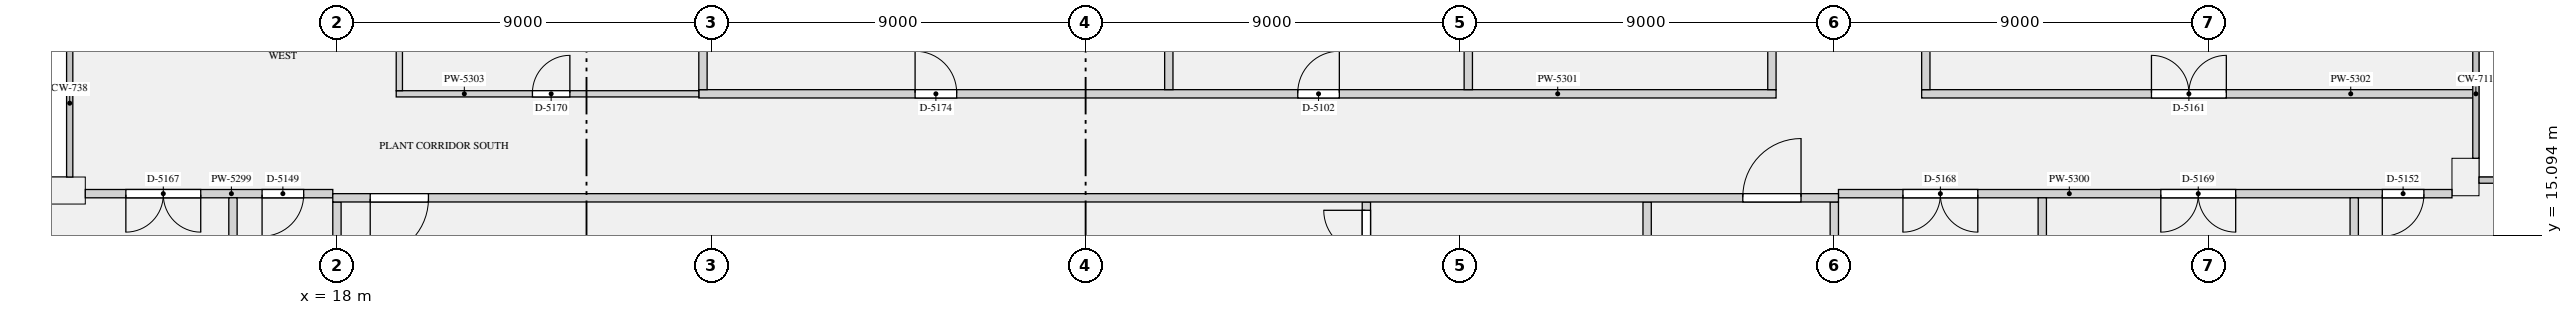
"""IFC4 building model, lengths in metres.
Left out: names, types, materials, properties, quantities, classifications, styles, units other than length and angle.
Written with IfcOpenShell. Run it as: python <this file> out.ifc"""

import sys

from ifc_helpers import new_model, si_unit, direction, frame, frame_2d, origin, origin_2d, place, context, subcontext, project, spatial, rectangle, extrude, element, fill, save


model = new_model("IFC4")
c1 = context("Model", 3, precision=1e-05, world=origin(), true_north=direction((0.0, 1.0)))
c2 = subcontext(c1, "Body", "Model", "MODEL_VIEW")
j1 = project(units=[si_unit("LENGTHUNIT", "METRE"), si_unit("PLANEANGLEUNIT", "RADIAN")], contexts=[c1])
p1 = place(None, origin())
s1 = spatial("IfcSite", under=j1, at=p1, CompositionType="ELEMENT")
p2 = place(p1, origin())
s2 = spatial("IfcBuilding", under=s1, at=p2, CompositionType="ELEMENT")
p3 = place(p2, frame((0.0, 0.0, 240.0)))
s3 = spatial("IfcBuildingStorey", under=s2, at=p3, CompositionType="ELEMENT", Elevation=240.0)
for number, where, z_axis, x_axis in (
    (1, (69.175, 16.5, 0.0), (0.0, 0.0, 1.0), (0.0, 1.0, 0.0)),
    (2, (11.5, 16.175, 0.0), (0.0, 0.0, 1.0), (-1.0, 0.0, 0.0)),
):
    element("IfcColumn", number, at=place(p3, frame(where, z_axis=z_axis, x_axis=x_axis)), inside=s3, PredefinedType="USERDEFINED", context=c2, shape_type="SweptSolid", body=[
        extrude(rectangle(XDim=0.9, YDim=0.65, at=origin_2d()), origin(), (0.0, 0.0, 1.0), 4.2),
    ])
p4 = place(p3, frame((18.0, 12.5, 0.0), z_axis=(0.0, 0.0, 1.0), x_axis=(0.0, 1.0, 0.0)))
e3 = element("IfcWall", 3, at=p4, inside=s3, PredefinedType="PARTITIONING", context=c2, shape_type="SweptSolid", body=[
    extrude(rectangle(XDim=3.4, YDim=0.2, at=frame_2d((1.7, 0.0))), origin(), (0.0, 0.0, 1.0), 3.85),
])
p5 = place(p3, frame((42.75, 12.5, 0.0), z_axis=(0.0, 0.0, 1.0), x_axis=(0.0, 1.0, 0.0)))
e4 = element("IfcWall", 4, at=p5, inside=s3, PredefinedType="PARTITIONING", context=c2, shape_type="SweptSolid", body=[
    extrude(rectangle(XDim=3.4, YDim=0.2, at=frame_2d((1.7, 0.0))), origin(), (0.0, 0.0, 1.0), 3.85),
])
p6 = place(p5, frame((2.2, 0.0, 0.0)))
e5 = element("IfcOpeningElement", 5, at=p6, cuts=e4, PredefinedType="OPENING", context=c2, shape_type="SweptSolid", body=[
    extrude(rectangle(XDim=1.0, YDim=2.1, at=frame_2d((0.5, 1.05))), frame((0.0, 0.11, 0.0), z_axis=(0.0, -1.0, 0.0), x_axis=(1.0, 0.0, 0.0)), (0.0, 0.0, 1.0), 0.22),
])
p7 = place(p3, frame((49.5, 12.5, 0.0), z_axis=(0.0, 0.0, 1.0), x_axis=(0.0, 1.0, 0.0)))
e6 = element("IfcWall", 6, at=p7, inside=s3, PredefinedType="PARTITIONING", context=c2, shape_type="SweptSolid", body=[
    extrude(rectangle(XDim=3.4, YDim=0.2, at=frame_2d((1.7, 0.0))), origin(), (0.0, 0.0, 1.0), 3.85),
])
p8 = place(p7, frame((1.15, 0.0, 0.0)))
e7 = element("IfcOpeningElement", 7, at=p8, cuts=e6, PredefinedType="OPENING", context=c2, shape_type="SweptSolid", body=[
    extrude(rectangle(XDim=1.1, YDim=2.1, at=frame_2d((0.55, 1.05))), frame((0.0, 0.11, 0.0), z_axis=(0.0, -1.0, 0.0), x_axis=(1.0, 0.0, 0.0)), (0.0, 0.0, 1.0), 0.22),
])
p9 = place(p3, frame((54.0, 12.5, 0.0), z_axis=(0.0, 0.0, 1.0), x_axis=(0.0, 1.0, 0.0)))
e8 = element("IfcWall", 8, at=p9, inside=s3, PredefinedType="PARTITIONING", context=c2, shape_type="SweptSolid", body=[
    extrude(rectangle(XDim=3.4, YDim=0.2, at=frame_2d((1.7, 0.0))), origin(), (0.0, 0.0, 1.0), 3.85),
])
p10 = place(p3, frame((17.9, 16.0, 0.0), z_axis=(0.0, 0.0, 1.0), x_axis=(1.0, 0.0, 0.0)))
e9 = element("IfcWall", 9, at=p10, inside=s3, PredefinedType="PARTITIONING", context=c2, shape_type="SweptSolid", body=[
    extrude(rectangle(XDim=36.2, YDim=0.2, at=frame_2d((18.1, 0.0))), origin(), (0.0, 0.0, 1.0), 3.85),
])
p11 = place(p10, frame((0.9, 0.0, 0.0)))
e10 = element("IfcOpeningElement", 10, at=p11, cuts=e9, PredefinedType="OPENING", context=c2, shape_type="SweptSolid", body=[
    extrude(rectangle(XDim=1.4, YDim=2.1, at=frame_2d((0.7, 1.05))), frame((0.0, 0.11, 0.0), z_axis=(0.0, -1.0, 0.0), x_axis=(1.0, 0.0, 0.0)), (0.0, 0.0, 1.0), 0.22),
])
p12 = place(p10, frame((33.9, 0.0, 0.0)))
e11 = element("IfcOpeningElement", 11, at=p12, cuts=e9, PredefinedType="OPENING", context=c2, shape_type="SweptSolid", body=[
    extrude(rectangle(XDim=1.4, YDim=2.1, at=frame_2d((0.7, 1.05))), frame((0.0, 0.11, 0.0), z_axis=(0.0, -1.0, 0.0), x_axis=(1.0, 0.0, 0.0)), (0.0, 0.0, 1.0), 0.22),
])
p13 = place(p3, frame((11.95, 16.1, 0.0), z_axis=(0.0, 0.0, 1.0), x_axis=(1.0, 0.0, 0.0)))
e12 = element("IfcWall", 12, at=p13, inside=s3, PredefinedType="PARTITIONING", context=c2, shape_type="SweptSolid", body=[
    extrude(rectangle(XDim=5.95, YDim=0.2, at=frame_2d((2.975, 0.0))), origin(), (0.0, 0.0, 1.0), 3.85),
])
p14 = place(p13, frame((0.975, 0.0, 0.0)))
e13 = element("IfcOpeningElement", 13, at=p14, cuts=e12, PredefinedType="OPENING", context=c2, shape_type="SweptSolid", body=[
    extrude(rectangle(XDim=1.8, YDim=2.1, at=frame_2d((0.9, 1.05))), frame((0.0, 0.11, 0.0), z_axis=(0.0, -1.0, 0.0), x_axis=(1.0, 0.0, 0.0)), (0.0, 0.0, 1.0), 0.22),
])
p15 = place(p13, frame((4.25, 0.0, 0.0)))
e14 = element("IfcOpeningElement", 14, at=p15, cuts=e12, PredefinedType="OPENING", context=c2, shape_type="SweptSolid", body=[
    extrude(rectangle(XDim=1.0, YDim=2.1, at=frame_2d((0.5, 1.05))), frame((0.0, 0.11, 0.0), z_axis=(0.0, -1.0, 0.0), x_axis=(1.0, 0.0, 0.0)), (0.0, 0.0, 1.0), 0.22),
])
p16 = place(p3, frame((54.1, 16.1, 0.0), z_axis=(0.0, 0.0, 1.0), x_axis=(1.0, 0.0, 0.0)))
e15 = element("IfcWall", 15, at=p16, inside=s3, PredefinedType="PARTITIONING", context=c2, shape_type="SweptSolid", body=[
    extrude(rectangle(XDim=14.75, YDim=0.2, at=frame_2d((7.375, 0.0))), origin(), (0.0, 0.0, 1.0), 3.85),
])
p17 = place(p16, frame((1.55, 0.0, 0.0)))
e16 = element("IfcOpeningElement", 16, at=p17, cuts=e15, PredefinedType="OPENING", context=c2, shape_type="SweptSolid", body=[
    extrude(rectangle(XDim=1.8, YDim=2.1, at=frame_2d((0.9, 1.05))), frame((0.0, 0.11, 0.0), z_axis=(0.0, -1.0, 0.0), x_axis=(1.0, 0.0, 0.0)), (0.0, 0.0, 1.0), 0.22),
])
p18 = place(p16, frame((7.75, 0.0, 0.0)))
e17 = element("IfcOpeningElement", 17, at=p18, cuts=e15, PredefinedType="OPENING", context=c2, shape_type="SweptSolid", body=[
    extrude(rectangle(XDim=1.8, YDim=2.1, at=frame_2d((0.9, 1.05))), frame((0.0, 0.11, 0.0), z_axis=(0.0, -1.0, 0.0), x_axis=(1.0, 0.0, 0.0)), (0.0, 0.0, 1.0), 0.22),
])
p19 = place(p16, frame((13.075, 0.0, 0.0)))
e18 = element("IfcOpeningElement", 18, at=p19, cuts=e15, PredefinedType="OPENING", context=c2, shape_type="SweptSolid", body=[
    extrude(rectangle(XDim=1.0, YDim=2.1, at=frame_2d((0.5, 1.05))), frame((0.0, 0.11, 0.0), z_axis=(0.0, -1.0, 0.0), x_axis=(1.0, 0.0, 0.0)), (0.0, 0.0, 1.0), 0.22),
])
p20 = place(p3, frame((26.7, 18.5, 0.0), z_axis=(0.0, 0.0, 1.0), x_axis=(1.0, 0.0, 0.0)))
e19 = element("IfcWall", 19, at=p20, inside=s3, PredefinedType="PARTITIONING", context=c2, shape_type="SweptSolid", body=[
    extrude(rectangle(XDim=25.9, YDim=0.2, at=frame_2d((12.95, 0.0))), origin(), (0.0, 0.0, 1.0), 3.85),
])
p21 = place(p20, frame((5.2, 0.0, 0.0)))
e20 = element("IfcOpeningElement", 20, at=p21, cuts=e19, PredefinedType="OPENING", context=c2, shape_type="SweptSolid", body=[
    extrude(rectangle(XDim=1.0, YDim=2.1, at=frame_2d((0.5, 1.05))), frame((0.0, 0.11, 0.0), z_axis=(0.0, -1.0, 0.0), x_axis=(1.0, 0.0, 0.0)), (0.0, 0.0, 1.0), 0.22),
])
p22 = place(p20, frame((14.4, 0.0, 0.0)))
e21 = element("IfcOpeningElement", 21, at=p22, cuts=e19, PredefinedType="OPENING", context=c2, shape_type="SweptSolid", body=[
    extrude(rectangle(XDim=1.0, YDim=2.1, at=frame_2d((0.5, 1.05))), frame((0.0, 0.11, 0.0), z_axis=(0.0, -1.0, 0.0), x_axis=(1.0, 0.0, 0.0)), (0.0, 0.0, 1.0), 0.22),
])
p23 = place(p3, frame((56.1, 18.5, 0.0), z_axis=(0.0, 0.0, 1.0), x_axis=(1.0, 0.0, 0.0)))
e22 = element("IfcWall", 22, at=p23, inside=s3, PredefinedType="PARTITIONING", context=c2, shape_type="SweptSolid", body=[
    extrude(rectangle(XDim=13.307, YDim=0.2, at=frame_2d((6.653, 0.0))), origin(), (0.0, 0.0, 1.0), 3.85),
])
p24 = place(p23, frame((5.525, 0.0, 0.0)))
e23 = element("IfcOpeningElement", 23, at=p24, cuts=e22, PredefinedType="OPENING", context=c2, shape_type="SweptSolid", body=[
    extrude(rectangle(XDim=1.8, YDim=2.1, at=frame_2d((0.9, 1.05))), frame((0.0, 0.11, 0.0), z_axis=(0.0, -1.0, 0.0), x_axis=(1.0, 0.0, 0.0)), (0.0, 0.0, 1.0), 0.22),
])
p25 = place(p3, frame((19.425, 18.5, 0.0), z_axis=(0.0, 0.0, 1.0), x_axis=(1.0, 0.0, 0.0)))
e24 = element("IfcWall", 24, at=p25, inside=s3, PredefinedType="PARTITIONING", context=c2, shape_type="SweptSolid", body=[
    extrude(rectangle(XDim=7.275, YDim=0.15, at=frame_2d((3.637, 0.0))), origin(), (0.0, 0.0, 1.0), 3.85),
])
p26 = place(p25, frame((3.275, 0.0, 0.0)))
e25 = element("IfcOpeningElement", 25, at=p26, cuts=e24, PredefinedType="OPENING", context=c2, shape_type="SweptSolid", body=[
    extrude(rectangle(XDim=0.9, YDim=2.1, at=frame_2d((0.45, 1.05))), frame((0.0, 0.085, 0.0), z_axis=(0.0, -1.0, 0.0), x_axis=(1.0, 0.0, 0.0)), (0.0, 0.0, 1.0), 0.17),
])
p27 = place(p3, frame((15.5, 0.093, 0.0), z_axis=(0.0, 0.0, 1.0), x_axis=(0.0, 1.0, 0.0)))
e26 = element("IfcWall", 26, at=p27, inside=s3, PredefinedType="PARTITIONING", context=c2, shape_type="SweptSolid", body=[
    extrude(rectangle(XDim=15.907, YDim=0.2, at=frame_2d((7.954, 0.0))), origin(), (0.0, 0.0, 1.0), 3.85),
])
p28 = place(p3, frame((59.0, 0.65, 0.0), z_axis=(0.0, 0.0, 1.0), x_axis=(0.0, 1.0, 0.0)))
e27 = element("IfcWall", 27, at=p28, inside=s3, PredefinedType="PARTITIONING", context=c2, shape_type="SweptSolid", body=[
    extrude(rectangle(XDim=15.35, YDim=0.2, at=frame_2d((7.675, 0.0))), origin(), (0.0, 0.0, 1.0), 3.85),
])
p29 = place(p3, frame((66.5, 0.093, 0.0), z_axis=(0.0, 0.0, 1.0), x_axis=(0.0, 1.0, 0.0)))
e28 = element("IfcWall", 28, at=p29, inside=s3, PredefinedType="PARTITIONING", context=c2, shape_type="SweptSolid", body=[
    extrude(rectangle(XDim=15.907, YDim=0.2, at=frame_2d((7.954, 0.0))), origin(), (0.0, 0.0, 1.0), 3.85),
])
p30 = place(p3, frame((19.5, 18.575, 0.0), z_axis=(0.0, 0.0, 1.0), x_axis=(0.0, 1.0, 0.0)))
e29 = element("IfcWall", 29, at=p30, inside=s3, PredefinedType="PARTITIONING", context=c2, shape_type="SweptSolid", body=[
    extrude(rectangle(XDim=2.325, YDim=0.15, at=frame_2d((1.163, 0.0))), origin(), (0.0, 0.0, 1.0), 3.85),
])
p31 = place(p3, frame((26.8, 18.6, 0.0), z_axis=(0.0, 0.0, 1.0), x_axis=(0.0, 1.0, 0.0)))
e30 = element("IfcWall", 30, at=p31, inside=s3, PredefinedType="PARTITIONING", context=c2, shape_type="SweptSolid", body=[
    extrude(rectangle(XDim=5.1, YDim=0.2, at=frame_2d((2.55, 0.0))), origin(), (0.0, 0.0, 1.0), 3.85),
])
p32 = place(p3, frame((38.0, 18.6, 0.0), z_axis=(0.0, 0.0, 1.0), x_axis=(0.0, 1.0, 0.0)))
e31 = element("IfcWall", 31, at=p32, inside=s3, PredefinedType="PARTITIONING", context=c2, shape_type="SweptSolid", body=[
    extrude(rectangle(XDim=5.304, YDim=0.2, at=frame_2d((2.652, 0.0))), origin(), (0.0, 0.0, 1.0), 3.85),
])
p33 = place(p3, frame((45.2, 18.6, 0.0), z_axis=(0.0, 0.0, 1.0), x_axis=(0.0, 1.0, 0.0)))
e32 = element("IfcWall", 32, at=p33, inside=s3, PredefinedType="PARTITIONING", context=c2, shape_type="SweptSolid", body=[
    extrude(rectangle(XDim=5.1, YDim=0.2, at=frame_2d((2.55, 0.0))), origin(), (0.0, 0.0, 1.0), 3.85),
])
p34 = place(p3, frame((52.5, 18.6, 0.0), z_axis=(0.0, 0.0, 1.0), x_axis=(0.0, 1.0, 0.0)))
e33 = element("IfcWall", 33, at=p34, inside=s3, PredefinedType="PARTITIONING", context=c2, shape_type="SweptSolid", body=[
    extrude(rectangle(XDim=7.3, YDim=0.2, at=frame_2d((3.65, 0.0))), origin(), (0.0, 0.0, 1.0), 3.85),
])
p35 = place(p34, frame((3.15, 0.0, 0.0)))
e34 = element("IfcOpeningElement", 34, at=p35, cuts=e33, PredefinedType="OPENING", context=c2, shape_type="SweptSolid", body=[
    extrude(rectangle(XDim=1.0, YDim=2.1, at=frame_2d((0.5, 1.05))), frame((0.0, 0.11, 0.0), z_axis=(0.0, -1.0, 0.0), x_axis=(1.0, 0.0, 0.0)), (0.0, 0.0, 1.0), 0.22),
])
p36 = place(p3, frame((56.2, 18.6, 0.0), z_axis=(0.0, 0.0, 1.0), x_axis=(0.0, 1.0, 0.0)))
e35 = element("IfcWall", 35, at=p36, inside=s3, PredefinedType="PARTITIONING", context=c2, shape_type="SweptSolid", body=[
    extrude(rectangle(XDim=4.3, YDim=0.2, at=frame_2d((2.15, 0.0))), origin(), (0.0, 0.0, 1.0), 3.85),
])
p37 = place(p6, origin())
e36 = element("IfcDoor", 36, at=p37, inside=s3, OperationType="SINGLE_SWING_RIGHT", PredefinedType="DOOR", context=c2, shape_type="SweptSolid", body=[
    extrude(rectangle(XDim=1.0, YDim=2.1, at=frame_2d((0.5, 1.05))), frame((0.0, 0.025, 0.0), z_axis=(0.0, -1.0, 0.0), x_axis=(1.0, 0.0, 0.0)), (0.0, 0.0, 1.0), 0.05),
])
fill(e5, e36)
p38 = place(p11, frame((1.4, 0.0, 0.0), z_axis=(0.0, 0.0, 1.0), x_axis=(-1.0, 0.0, 0.0)))
e37 = element("IfcDoor", 37, at=p38, inside=s3, OperationType="SINGLE_SWING_RIGHT", PredefinedType="DOOR", context=c2, shape_type="SweptSolid", body=[
    extrude(rectangle(XDim=1.4, YDim=2.1, at=frame_2d((0.7, 1.05))), frame((0.0, 0.025, 0.0), z_axis=(0.0, -1.0, 0.0), x_axis=(1.0, 0.0, 0.0)), (0.0, 0.0, 1.0), 0.05),
])
fill(e10, e37)
p39 = place(p12, origin())
e38 = element("IfcDoor", 38, at=p39, inside=s3, OperationType="SINGLE_SWING_RIGHT", PredefinedType="DOOR", context=c2, shape_type="SweptSolid", body=[
    extrude(rectangle(XDim=1.4, YDim=2.1, at=frame_2d((0.7, 1.05))), frame((0.0, 0.025, 0.0), z_axis=(0.0, -1.0, 0.0), x_axis=(1.0, 0.0, 0.0)), (0.0, 0.0, 1.0), 0.05),
])
fill(e11, e38)
p40 = place(p14, frame((1.8, 0.0, 0.0), z_axis=(0.0, 0.0, 1.0), x_axis=(-1.0, 0.0, 0.0)))
e39 = element("IfcDoor", 39, at=p40, inside=s3, OperationType="DOUBLE_DOOR_SINGLE_SWING", PredefinedType="DOOR", context=c2, shape_type="SweptSolid", body=[
    extrude(rectangle(XDim=1.8, YDim=2.1, at=frame_2d((0.9, 1.05))), frame((0.0, 0.025, 0.0), z_axis=(0.0, -1.0, 0.0), x_axis=(1.0, 0.0, 0.0)), (0.0, 0.0, 1.0), 0.05),
])
fill(e13, e39)
p41 = place(p15, frame((1.0, 0.0, 0.0), z_axis=(0.0, 0.0, 1.0), x_axis=(-1.0, 0.0, 0.0)))
e40 = element("IfcDoor", 40, at=p41, inside=s3, OperationType="SINGLE_SWING_RIGHT", PredefinedType="DOOR", context=c2, shape_type="SweptSolid", body=[
    extrude(rectangle(XDim=1.0, YDim=2.1, at=frame_2d((0.5, 1.05))), frame((0.0, 0.025, 0.0), z_axis=(0.0, -1.0, 0.0), x_axis=(1.0, 0.0, 0.0)), (0.0, 0.0, 1.0), 0.05),
])
fill(e14, e40)
p42 = place(p17, frame((1.8, 0.0, 0.0), z_axis=(0.0, 0.0, 1.0), x_axis=(-1.0, 0.0, 0.0)))
e41 = element("IfcDoor", 41, at=p42, inside=s3, OperationType="DOUBLE_DOOR_SINGLE_SWING", PredefinedType="DOOR", context=c2, shape_type="SweptSolid", body=[
    extrude(rectangle(XDim=1.8, YDim=2.1, at=frame_2d((0.9, 1.05))), frame((0.0, 0.025, 0.0), z_axis=(0.0, -1.0, 0.0), x_axis=(1.0, 0.0, 0.0)), (0.0, 0.0, 1.0), 0.05),
])
fill(e16, e41)
p43 = place(p18, frame((1.8, 0.0, 0.0), z_axis=(0.0, 0.0, 1.0), x_axis=(-1.0, 0.0, 0.0)))
e42 = element("IfcDoor", 42, at=p43, inside=s3, OperationType="DOUBLE_DOOR_SINGLE_SWING", PredefinedType="DOOR", context=c2, shape_type="SweptSolid", body=[
    extrude(rectangle(XDim=1.8, YDim=2.1, at=frame_2d((0.9, 1.05))), frame((0.0, 0.025, 0.0), z_axis=(0.0, -1.0, 0.0), x_axis=(1.0, 0.0, 0.0)), (0.0, 0.0, 1.0), 0.05),
])
fill(e17, e42)
p44 = place(p19, frame((1.0, 0.0, 0.0), z_axis=(0.0, 0.0, 1.0), x_axis=(-1.0, 0.0, 0.0)))
e43 = element("IfcDoor", 43, at=p44, inside=s3, OperationType="SINGLE_SWING_RIGHT", PredefinedType="DOOR", context=c2, shape_type="SweptSolid", body=[
    extrude(rectangle(XDim=1.0, YDim=2.1, at=frame_2d((0.5, 1.05))), frame((0.0, 0.025, 0.0), z_axis=(0.0, -1.0, 0.0), x_axis=(1.0, 0.0, 0.0)), (0.0, 0.0, 1.0), 0.05),
])
fill(e18, e43)
p45 = place(p26, origin())
e44 = element("IfcDoor", 44, at=p45, inside=s3, OperationType="SINGLE_SWING_RIGHT", PredefinedType="DOOR", context=c2, shape_type="SweptSolid", body=[
    extrude(rectangle(XDim=0.9, YDim=2.1, at=frame_2d((0.45, 1.05))), frame((0.0, 0.025, 0.0), z_axis=(0.0, -1.0, 0.0), x_axis=(1.0, 0.0, 0.0)), (0.0, 0.0, 1.0), 0.05),
])
fill(e25, e44)
p46 = place(p21, origin())
e45 = element("IfcDoor", 45, at=p46, inside=s3, OperationType="SINGLE_SWING_LEFT", PredefinedType="DOOR", context=c2, shape_type="SweptSolid", body=[
    extrude(rectangle(XDim=1.0, YDim=2.1, at=frame_2d((0.5, 1.05))), frame((0.0, 0.025, 0.0), z_axis=(0.0, -1.0, 0.0), x_axis=(1.0, 0.0, 0.0)), (0.0, 0.0, 1.0), 0.05),
])
fill(e20, e45)
p47 = place(p22, origin())
e46 = element("IfcDoor", 46, at=p47, inside=s3, OperationType="SINGLE_SWING_RIGHT", PredefinedType="DOOR", context=c2, shape_type="SweptSolid", body=[
    extrude(rectangle(XDim=1.0, YDim=2.1, at=frame_2d((0.5, 1.05))), frame((0.0, 0.025, 0.0), z_axis=(0.0, -1.0, 0.0), x_axis=(1.0, 0.0, 0.0)), (0.0, 0.0, 1.0), 0.05),
])
fill(e21, e46)
p48 = place(p24, origin())
e47 = element("IfcDoor", 47, at=p48, inside=s3, OperationType="DOUBLE_DOOR_SINGLE_SWING", PredefinedType="DOOR", context=c2, shape_type="SweptSolid", body=[
    extrude(rectangle(XDim=1.8, YDim=2.1, at=frame_2d((0.9, 1.05))), frame((0.0, 0.025, 0.0), z_axis=(0.0, -1.0, 0.0), x_axis=(1.0, 0.0, 0.0)), (0.0, 0.0, 1.0), 0.05),
])
fill(e23, e47)
save(model, sys.argv[1])
